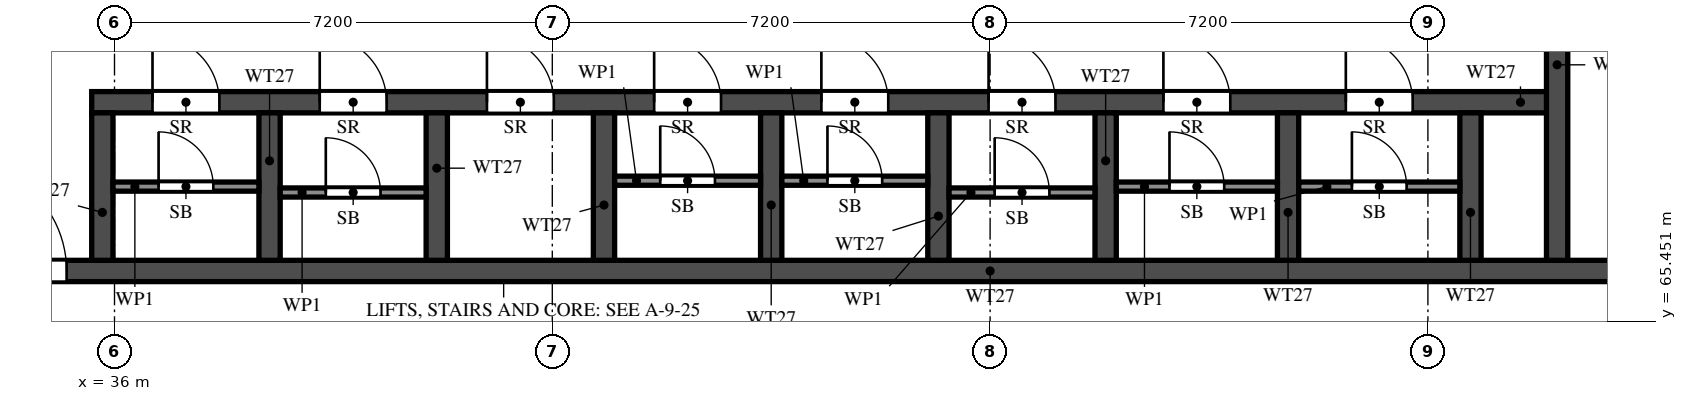
"""IFC4 building model, lengths in metres.
Left out: names, types, materials, properties, quantities, classifications, styles, units other than length and angle.
Written with IfcOpenShell. Run it as: python <this file> out.ifc"""

import sys

from ifc_helpers import new_model, si_unit, direction, frame, frame_2d, origin, place, context, subcontext, project, spatial, rectangle, extrude, element, fill, save


model = new_model("IFC4")
c1 = context("Model", 3, precision=1e-05, world=origin(), true_north=direction((0.0, 1.0)))
c2 = subcontext(c1, "Body", "Model", "MODEL_VIEW")
j1 = project(units=[si_unit("LENGTHUNIT", "METRE"), si_unit("PLANEANGLEUNIT", "RADIAN")], contexts=[c1])
p1 = place(None, origin())
s1 = spatial("IfcSite", under=j1, at=p1, CompositionType="ELEMENT")
p2 = place(p1, origin())
s2 = spatial("IfcBuilding", under=s1, at=p2, CompositionType="ELEMENT")
p3 = place(p2, frame((0.0, 0.0, 188.5)))
s3 = spatial("IfcBuildingStorey", under=s2, at=p3, CompositionType="ELEMENT", Elevation=188.5)
p4 = place(p3, frame((29.7, 66.275, 0.0), z_axis=(0.0, 0.0, 1.0), x_axis=(1.0, 0.0, 0.0)))
e1 = element("IfcWall", 1, at=p4, inside=s3, PredefinedType="SHEAR", context=c2, shape_type="SweptSolid", body=[
    extrude(rectangle(XDim=41.4, YDim=0.35, at=frame_2d((20.7, 0.0))), origin(), (0.0, 0.0, 1.0), 3.2),
])
p5 = place(p4, frame((0.925, 0.0, 0.0)))
e2 = element("IfcOpeningElement", 2, at=p5, cuts=e1, PredefinedType="OPENING", context=c2, shape_type="SweptSolid", body=[
    extrude(rectangle(XDim=1.1, YDim=2.1, at=frame_2d((0.55, 1.05))), frame((0.0, 0.185, 0.0), z_axis=(0.0, -1.0, 0.0), x_axis=(1.0, 0.0, 0.0)), (0.0, 0.0, 1.0), 0.37),
])
p6 = place(p4, frame((3.712, 0.0, 0.0)))
e3 = element("IfcOpeningElement", 3, at=p6, cuts=e1, PredefinedType="OPENING", context=c2, shape_type="SweptSolid", body=[
    extrude(rectangle(XDim=1.8, YDim=2.1, at=frame_2d((0.9, 1.05))), frame((0.0, 0.185, 0.0), z_axis=(0.0, -1.0, 0.0), x_axis=(1.0, 0.0, 0.0)), (0.0, 0.0, 1.0), 0.37),
])
p7 = place(p3, frame((35.625, 69.05, 0.0), z_axis=(0.0, 0.0, 1.0), x_axis=(1.0, 0.0, 0.0)))
e4 = element("IfcWall", 4, at=p7, inside=s3, PredefinedType="SHEAR", context=c2, shape_type="SweptSolid", body=[
    extrude(rectangle(XDim=24.1, YDim=0.35, at=frame_2d((12.05, 0.0))), origin(), (0.0, 0.0, 1.0), 3.2),
])
p8 = place(p7, frame((1.0, 0.0, 0.0)))
e5 = element("IfcOpeningElement", 5, at=p8, cuts=e4, PredefinedType="OPENING", context=c2, shape_type="SweptSolid", body=[
    extrude(rectangle(XDim=1.1, YDim=2.1, at=frame_2d((0.55, 1.05))), frame((0.0, 0.185, 0.0), z_axis=(0.0, -1.0, 0.0), x_axis=(1.0, 0.0, 0.0)), (0.0, 0.0, 1.0), 0.37),
])
p9 = place(p7, frame((3.75, 0.0, 0.0)))
e6 = element("IfcOpeningElement", 6, at=p9, cuts=e4, PredefinedType="OPENING", context=c2, shape_type="SweptSolid", body=[
    extrude(rectangle(XDim=1.1, YDim=2.1, at=frame_2d((0.55, 1.05))), frame((0.0, 0.185, 0.0), z_axis=(0.0, -1.0, 0.0), x_axis=(1.0, 0.0, 0.0)), (0.0, 0.0, 1.0), 0.37),
])
p10 = place(p7, frame((6.5, 0.0, 0.0)))
e7 = element("IfcOpeningElement", 7, at=p10, cuts=e4, PredefinedType="OPENING", context=c2, shape_type="SweptSolid", body=[
    extrude(rectangle(XDim=1.1, YDim=2.1, at=frame_2d((0.55, 1.05))), frame((0.0, 0.185, 0.0), z_axis=(0.0, -1.0, 0.0), x_axis=(1.0, 0.0, 0.0)), (0.0, 0.0, 1.0), 0.37),
])
p11 = place(p7, frame((9.25, 0.0, 0.0)))
e8 = element("IfcOpeningElement", 8, at=p11, cuts=e4, PredefinedType="OPENING", context=c2, shape_type="SweptSolid", body=[
    extrude(rectangle(XDim=1.1, YDim=2.1, at=frame_2d((0.55, 1.05))), frame((0.0, 0.185, 0.0), z_axis=(0.0, -1.0, 0.0), x_axis=(1.0, 0.0, 0.0)), (0.0, 0.0, 1.0), 0.37),
])
p12 = place(p7, frame((12.0, 0.0, 0.0)))
e9 = element("IfcOpeningElement", 9, at=p12, cuts=e4, PredefinedType="OPENING", context=c2, shape_type="SweptSolid", body=[
    extrude(rectangle(XDim=1.1, YDim=2.1, at=frame_2d((0.55, 1.05))), frame((0.0, 0.185, 0.0), z_axis=(0.0, -1.0, 0.0), x_axis=(1.0, 0.0, 0.0)), (0.0, 0.0, 1.0), 0.37),
])
p13 = place(p7, frame((14.75, 0.0, 0.0)))
e10 = element("IfcOpeningElement", 10, at=p13, cuts=e4, PredefinedType="OPENING", context=c2, shape_type="SweptSolid", body=[
    extrude(rectangle(XDim=1.1, YDim=2.1, at=frame_2d((0.55, 1.05))), frame((0.0, 0.185, 0.0), z_axis=(0.0, -1.0, 0.0), x_axis=(1.0, 0.0, 0.0)), (0.0, 0.0, 1.0), 0.37),
])
p14 = place(p7, frame((17.625, 0.0, 0.0)))
e11 = element("IfcOpeningElement", 11, at=p14, cuts=e4, PredefinedType="OPENING", context=c2, shape_type="SweptSolid", body=[
    extrude(rectangle(XDim=1.1, YDim=2.1, at=frame_2d((0.55, 1.05))), frame((0.0, 0.185, 0.0), z_axis=(0.0, -1.0, 0.0), x_axis=(1.0, 0.0, 0.0)), (0.0, 0.0, 1.0), 0.37),
])
p15 = place(p7, frame((20.625, 0.0, 0.0)))
e12 = element("IfcOpeningElement", 12, at=p15, cuts=e4, PredefinedType="OPENING", context=c2, shape_type="SweptSolid", body=[
    extrude(rectangle(XDim=1.1, YDim=2.1, at=frame_2d((0.55, 1.05))), frame((0.0, 0.185, 0.0), z_axis=(0.0, -1.0, 0.0), x_axis=(1.0, 0.0, 0.0)), (0.0, 0.0, 1.0), 0.37),
])
p16 = place(p3, frame((59.725, 66.45, 0.0), z_axis=(0.0, 0.0, 1.0), x_axis=(0.0, 1.0, 0.0)))
e13 = element("IfcWall", 13, at=p16, inside=s3, PredefinedType="SHEAR", context=c2, shape_type="SweptSolid", body=[
    extrude(rectangle(XDim=6.125, YDim=0.35, at=frame_2d((3.062, 0.0))), origin(), (0.0, 0.0, 1.0), 3.2),
])
p17 = place(p16, frame((3.85, 0.0, 0.0)))
e14 = element("IfcOpeningElement", 14, at=p17, cuts=e13, PredefinedType="OPENING", context=c2, shape_type="SweptSolid", body=[
    extrude(rectangle(XDim=1.2, YDim=2.1, at=frame_2d((0.6, 1.05))), frame((0.0, 0.185, 0.0), z_axis=(0.0, -1.0, 0.0), x_axis=(1.0, 0.0, 0.0)), (0.0, 0.0, 1.0), 0.37),
])
for number, where, z_axis, x_axis in (
    (15, (35.8, 66.45, 0.0), (0.0, 0.0, 1.0), (0.0, 1.0, 0.0)),
    (16, (38.55, 66.45, 0.0), (0.0, 0.0, 1.0), (0.0, 1.0, 0.0)),
    (17, (41.3, 66.45, 0.0), (0.0, 0.0, 1.0), (0.0, 1.0, 0.0)),
    (18, (44.05, 66.45, 0.0), (0.0, 0.0, 1.0), (0.0, 1.0, 0.0)),
    (19, (46.8, 66.45, 0.0), (0.0, 0.0, 1.0), (0.0, 1.0, 0.0)),
    (20, (49.55, 66.45, 0.0), (0.0, 0.0, 1.0), (0.0, 1.0, 0.0)),
    (21, (52.3, 66.45, 0.0), (0.0, 0.0, 1.0), (0.0, 1.0, 0.0)),
    (22, (55.3, 66.45, 0.0), (0.0, 0.0, 1.0), (0.0, 1.0, 0.0)),
    (23, (58.3, 66.45, 0.0), (0.0, 0.0, 1.0), (0.0, 1.0, 0.0)),
):
    element("IfcWall", number, at=place(p3, frame(where, z_axis=z_axis, x_axis=x_axis)), inside=s3, PredefinedType="SHEAR", context=c2, shape_type="SweptSolid", body=[
        extrude(rectangle(XDim=2.425, YDim=0.35, at=frame_2d((1.212, 0.0))), origin(), (0.0, 0.0, 1.0), 3.2),
    ])
p18 = place(p3, frame((35.975, 67.663, 0.0), z_axis=(0.0, 0.0, 1.0), x_axis=(1.0, 0.0, 0.0)))
e24 = element("IfcWall", 24, at=p18, inside=s3, PredefinedType="PARTITIONING", context=c2, shape_type="SweptSolid", body=[
    extrude(rectangle(XDim=2.4, YDim=0.15, at=frame_2d((1.2, 0.0))), origin(), (0.0, 0.0, 1.0), 3.2),
])
p19 = place(p18, frame((0.75, 0.0, 0.0)))
e25 = element("IfcOpeningElement", 25, at=p19, cuts=e24, PredefinedType="OPENING", context=c2, shape_type="SweptSolid", body=[
    extrude(rectangle(XDim=0.9, YDim=2.1, at=frame_2d((0.45, 1.05))), frame((0.0, 0.085, 0.0), z_axis=(0.0, -1.0, 0.0), x_axis=(1.0, 0.0, 0.0)), (0.0, 0.0, 1.0), 0.17),
])
p20 = place(p3, frame((38.725, 67.565, 0.0), z_axis=(0.0, 0.0, 1.0), x_axis=(1.0, 0.0, 0.0)))
e26 = element("IfcWall", 26, at=p20, inside=s3, PredefinedType="PARTITIONING", context=c2, shape_type="SweptSolid", body=[
    extrude(rectangle(XDim=2.4, YDim=0.15, at=frame_2d((1.2, 0.0))), origin(), (0.0, 0.0, 1.0), 3.2),
])
p21 = place(p20, frame((0.75, 0.0, 0.0)))
e27 = element("IfcOpeningElement", 27, at=p21, cuts=e26, PredefinedType="OPENING", context=c2, shape_type="SweptSolid", body=[
    extrude(rectangle(XDim=0.9, YDim=2.1, at=frame_2d((0.45, 1.05))), frame((0.0, 0.085, 0.0), z_axis=(0.0, -1.0, 0.0), x_axis=(1.0, 0.0, 0.0)), (0.0, 0.0, 1.0), 0.17),
])
p22 = place(p3, frame((44.225, 67.76, 0.0), z_axis=(0.0, 0.0, 1.0), x_axis=(1.0, 0.0, 0.0)))
e28 = element("IfcWall", 28, at=p22, inside=s3, PredefinedType="PARTITIONING", context=c2, shape_type="SweptSolid", body=[
    extrude(rectangle(XDim=2.4, YDim=0.15, at=frame_2d((1.2, 0.0))), origin(), (0.0, 0.0, 1.0), 3.2),
])
p23 = place(p22, frame((0.75, 0.0, 0.0)))
e29 = element("IfcOpeningElement", 29, at=p23, cuts=e28, PredefinedType="OPENING", context=c2, shape_type="SweptSolid", body=[
    extrude(rectangle(XDim=0.9, YDim=2.1, at=frame_2d((0.45, 1.05))), frame((0.0, 0.085, 0.0), z_axis=(0.0, -1.0, 0.0), x_axis=(1.0, 0.0, 0.0)), (0.0, 0.0, 1.0), 0.17),
])
p24 = place(p3, frame((46.975, 67.76, 0.0), z_axis=(0.0, 0.0, 1.0), x_axis=(1.0, 0.0, 0.0)))
e30 = element("IfcWall", 30, at=p24, inside=s3, PredefinedType="PARTITIONING", context=c2, shape_type="SweptSolid", body=[
    extrude(rectangle(XDim=2.4, YDim=0.15, at=frame_2d((1.2, 0.0))), origin(), (0.0, 0.0, 1.0), 3.2),
])
p25 = place(p24, frame((0.75, 0.0, 0.0)))
e31 = element("IfcOpeningElement", 31, at=p25, cuts=e30, PredefinedType="OPENING", context=c2, shape_type="SweptSolid", body=[
    extrude(rectangle(XDim=0.9, YDim=2.1, at=frame_2d((0.45, 1.05))), frame((0.0, 0.085, 0.0), z_axis=(0.0, -1.0, 0.0), x_axis=(1.0, 0.0, 0.0)), (0.0, 0.0, 1.0), 0.17),
])
p26 = place(p3, frame((49.725, 67.565, 0.0), z_axis=(0.0, 0.0, 1.0), x_axis=(1.0, 0.0, 0.0)))
e32 = element("IfcWall", 32, at=p26, inside=s3, PredefinedType="PARTITIONING", context=c2, shape_type="SweptSolid", body=[
    extrude(rectangle(XDim=2.4, YDim=0.15, at=frame_2d((1.2, 0.0))), origin(), (0.0, 0.0, 1.0), 3.2),
])
p27 = place(p26, frame((0.75, 0.0, 0.0)))
e33 = element("IfcOpeningElement", 33, at=p27, cuts=e32, PredefinedType="OPENING", context=c2, shape_type="SweptSolid", body=[
    extrude(rectangle(XDim=0.9, YDim=2.1, at=frame_2d((0.45, 1.05))), frame((0.0, 0.085, 0.0), z_axis=(0.0, -1.0, 0.0), x_axis=(1.0, 0.0, 0.0)), (0.0, 0.0, 1.0), 0.17),
])
p28 = place(p3, frame((52.475, 67.663, 0.0), z_axis=(0.0, 0.0, 1.0), x_axis=(1.0, 0.0, 0.0)))
e34 = element("IfcWall", 34, at=p28, inside=s3, PredefinedType="PARTITIONING", context=c2, shape_type="SweptSolid", body=[
    extrude(rectangle(XDim=2.65, YDim=0.15, at=frame_2d((1.325, 0.0))), origin(), (0.0, 0.0, 1.0), 3.2),
])
p29 = place(p28, frame((0.875, 0.0, 0.0)))
e35 = element("IfcOpeningElement", 35, at=p29, cuts=e34, PredefinedType="OPENING", context=c2, shape_type="SweptSolid", body=[
    extrude(rectangle(XDim=0.9, YDim=2.1, at=frame_2d((0.45, 1.05))), frame((0.0, 0.085, 0.0), z_axis=(0.0, -1.0, 0.0), x_axis=(1.0, 0.0, 0.0)), (0.0, 0.0, 1.0), 0.17),
])
p30 = place(p3, frame((55.475, 67.663, 0.0), z_axis=(0.0, 0.0, 1.0), x_axis=(1.0, 0.0, 0.0)))
e36 = element("IfcWall", 36, at=p30, inside=s3, PredefinedType="PARTITIONING", context=c2, shape_type="SweptSolid", body=[
    extrude(rectangle(XDim=2.65, YDim=0.15, at=frame_2d((1.325, 0.0))), origin(), (0.0, 0.0, 1.0), 3.2),
])
p31 = place(p30, frame((0.875, 0.0, 0.0)))
e37 = element("IfcOpeningElement", 37, at=p31, cuts=e36, PredefinedType="OPENING", context=c2, shape_type="SweptSolid", body=[
    extrude(rectangle(XDim=0.9, YDim=2.1, at=frame_2d((0.45, 1.05))), frame((0.0, 0.085, 0.0), z_axis=(0.0, -1.0, 0.0), x_axis=(1.0, 0.0, 0.0)), (0.0, 0.0, 1.0), 0.17),
])
p32 = place(p6, origin())
e38 = element("IfcDoor", 38, at=p32, inside=s3, OperationType="DOUBLE_DOOR_SINGLE_SWING", PredefinedType="DOOR", context=c2, shape_type="SweptSolid", body=[
    extrude(rectangle(XDim=1.8, YDim=2.1, at=frame_2d((0.9, 1.05))), frame((0.0, 0.025, 0.0), z_axis=(0.0, -1.0, 0.0), x_axis=(1.0, 0.0, 0.0)), (0.0, 0.0, 1.0), 0.05),
])
fill(e3, e38)
p33 = place(p8, origin())
e39 = element("IfcDoor", 39, at=p33, inside=s3, OperationType="SINGLE_SWING_RIGHT", PredefinedType="DOOR", context=c2, shape_type="SweptSolid", body=[
    extrude(rectangle(XDim=1.1, YDim=2.1, at=frame_2d((0.55, 1.05))), frame((0.0, 0.025, 0.0), z_axis=(0.0, -1.0, 0.0), x_axis=(1.0, 0.0, 0.0)), (0.0, 0.0, 1.0), 0.05),
])
fill(e5, e39)
p34 = place(p19, origin())
e40 = element("IfcDoor", 40, at=p34, inside=s3, OperationType="SINGLE_SWING_RIGHT", PredefinedType="DOOR", context=c2, shape_type="SweptSolid", body=[
    extrude(rectangle(XDim=0.9, YDim=2.1, at=frame_2d((0.45, 1.05))), frame((0.0, 0.025, 0.0), z_axis=(0.0, -1.0, 0.0), x_axis=(1.0, 0.0, 0.0)), (0.0, 0.0, 1.0), 0.05),
])
fill(e25, e40)
p35 = place(p9, origin())
e41 = element("IfcDoor", 41, at=p35, inside=s3, OperationType="SINGLE_SWING_LEFT", PredefinedType="DOOR", context=c2, shape_type="SweptSolid", body=[
    extrude(rectangle(XDim=1.1, YDim=2.1, at=frame_2d((0.55, 1.05))), frame((0.0, 0.025, 0.0), z_axis=(0.0, -1.0, 0.0), x_axis=(1.0, 0.0, 0.0)), (0.0, 0.0, 1.0), 0.05),
])
fill(e6, e41)
p36 = place(p21, origin())
e42 = element("IfcDoor", 42, at=p36, inside=s3, OperationType="SINGLE_SWING_LEFT", PredefinedType="DOOR", context=c2, shape_type="SweptSolid", body=[
    extrude(rectangle(XDim=0.9, YDim=2.1, at=frame_2d((0.45, 1.05))), frame((0.0, 0.025, 0.0), z_axis=(0.0, -1.0, 0.0), x_axis=(1.0, 0.0, 0.0)), (0.0, 0.0, 1.0), 0.05),
])
fill(e27, e42)
p37 = place(p10, origin())
e43 = element("IfcDoor", 43, at=p37, inside=s3, OperationType="SINGLE_SWING_RIGHT", PredefinedType="DOOR", context=c2, shape_type="SweptSolid", body=[
    extrude(rectangle(XDim=1.1, YDim=2.1, at=frame_2d((0.55, 1.05))), frame((0.0, 0.025, 0.0), z_axis=(0.0, -1.0, 0.0), x_axis=(1.0, 0.0, 0.0)), (0.0, 0.0, 1.0), 0.05),
])
fill(e7, e43)
p38 = place(p11, origin())
e44 = element("IfcDoor", 44, at=p38, inside=s3, OperationType="SINGLE_SWING_LEFT", PredefinedType="DOOR", context=c2, shape_type="SweptSolid", body=[
    extrude(rectangle(XDim=1.1, YDim=2.1, at=frame_2d((0.55, 1.05))), frame((0.0, 0.025, 0.0), z_axis=(0.0, -1.0, 0.0), x_axis=(1.0, 0.0, 0.0)), (0.0, 0.0, 1.0), 0.05),
])
fill(e8, e44)
p39 = place(p23, origin())
e45 = element("IfcDoor", 45, at=p39, inside=s3, OperationType="SINGLE_SWING_RIGHT", PredefinedType="DOOR", context=c2, shape_type="SweptSolid", body=[
    extrude(rectangle(XDim=0.9, YDim=2.1, at=frame_2d((0.45, 1.05))), frame((0.0, 0.025, 0.0), z_axis=(0.0, -1.0, 0.0), x_axis=(1.0, 0.0, 0.0)), (0.0, 0.0, 1.0), 0.05),
])
fill(e29, e45)
p40 = place(p12, origin())
e46 = element("IfcDoor", 46, at=p40, inside=s3, OperationType="SINGLE_SWING_RIGHT", PredefinedType="DOOR", context=c2, shape_type="SweptSolid", body=[
    extrude(rectangle(XDim=1.1, YDim=2.1, at=frame_2d((0.55, 1.05))), frame((0.0, 0.025, 0.0), z_axis=(0.0, -1.0, 0.0), x_axis=(1.0, 0.0, 0.0)), (0.0, 0.0, 1.0), 0.05),
])
fill(e9, e46)
p41 = place(p25, origin())
e47 = element("IfcDoor", 47, at=p41, inside=s3, OperationType="SINGLE_SWING_LEFT", PredefinedType="DOOR", context=c2, shape_type="SweptSolid", body=[
    extrude(rectangle(XDim=0.9, YDim=2.1, at=frame_2d((0.45, 1.05))), frame((0.0, 0.025, 0.0), z_axis=(0.0, -1.0, 0.0), x_axis=(1.0, 0.0, 0.0)), (0.0, 0.0, 1.0), 0.05),
])
fill(e31, e47)
p42 = place(p13, origin())
e48 = element("IfcDoor", 48, at=p42, inside=s3, OperationType="SINGLE_SWING_LEFT", PredefinedType="DOOR", context=c2, shape_type="SweptSolid", body=[
    extrude(rectangle(XDim=1.1, YDim=2.1, at=frame_2d((0.55, 1.05))), frame((0.0, 0.025, 0.0), z_axis=(0.0, -1.0, 0.0), x_axis=(1.0, 0.0, 0.0)), (0.0, 0.0, 1.0), 0.05),
])
fill(e10, e48)
p43 = place(p27, origin())
e49 = element("IfcDoor", 49, at=p43, inside=s3, OperationType="SINGLE_SWING_LEFT", PredefinedType="DOOR", context=c2, shape_type="SweptSolid", body=[
    extrude(rectangle(XDim=0.9, YDim=2.1, at=frame_2d((0.45, 1.05))), frame((0.0, 0.025, 0.0), z_axis=(0.0, -1.0, 0.0), x_axis=(1.0, 0.0, 0.0)), (0.0, 0.0, 1.0), 0.05),
])
fill(e33, e49)
p44 = place(p14, origin())
e50 = element("IfcDoor", 50, at=p44, inside=s3, OperationType="SINGLE_SWING_RIGHT", PredefinedType="DOOR", context=c2, shape_type="SweptSolid", body=[
    extrude(rectangle(XDim=1.1, YDim=2.1, at=frame_2d((0.55, 1.05))), frame((0.0, 0.025, 0.0), z_axis=(0.0, -1.0, 0.0), x_axis=(1.0, 0.0, 0.0)), (0.0, 0.0, 1.0), 0.05),
])
fill(e11, e50)
p45 = place(p29, origin())
e51 = element("IfcDoor", 51, at=p45, inside=s3, OperationType="SINGLE_SWING_LEFT", PredefinedType="DOOR", context=c2, shape_type="SweptSolid", body=[
    extrude(rectangle(XDim=0.9, YDim=2.1, at=frame_2d((0.45, 1.05))), frame((0.0, 0.025, 0.0), z_axis=(0.0, -1.0, 0.0), x_axis=(1.0, 0.0, 0.0)), (0.0, 0.0, 1.0), 0.05),
])
fill(e35, e51)
p46 = place(p15, origin())
e52 = element("IfcDoor", 52, at=p46, inside=s3, OperationType="SINGLE_SWING_RIGHT", PredefinedType="DOOR", context=c2, shape_type="SweptSolid", body=[
    extrude(rectangle(XDim=1.1, YDim=2.1, at=frame_2d((0.55, 1.05))), frame((0.0, 0.025, 0.0), z_axis=(0.0, -1.0, 0.0), x_axis=(1.0, 0.0, 0.0)), (0.0, 0.0, 1.0), 0.05),
])
fill(e12, e52)
p47 = place(p31, origin())
e53 = element("IfcDoor", 53, at=p47, inside=s3, OperationType="SINGLE_SWING_LEFT", PredefinedType="DOOR", context=c2, shape_type="SweptSolid", body=[
    extrude(rectangle(XDim=0.9, YDim=2.1, at=frame_2d((0.45, 1.05))), frame((0.0, 0.025, 0.0), z_axis=(0.0, -1.0, 0.0), x_axis=(1.0, 0.0, 0.0)), (0.0, 0.0, 1.0), 0.05),
])
fill(e37, e53)
save(model, sys.argv[1])
